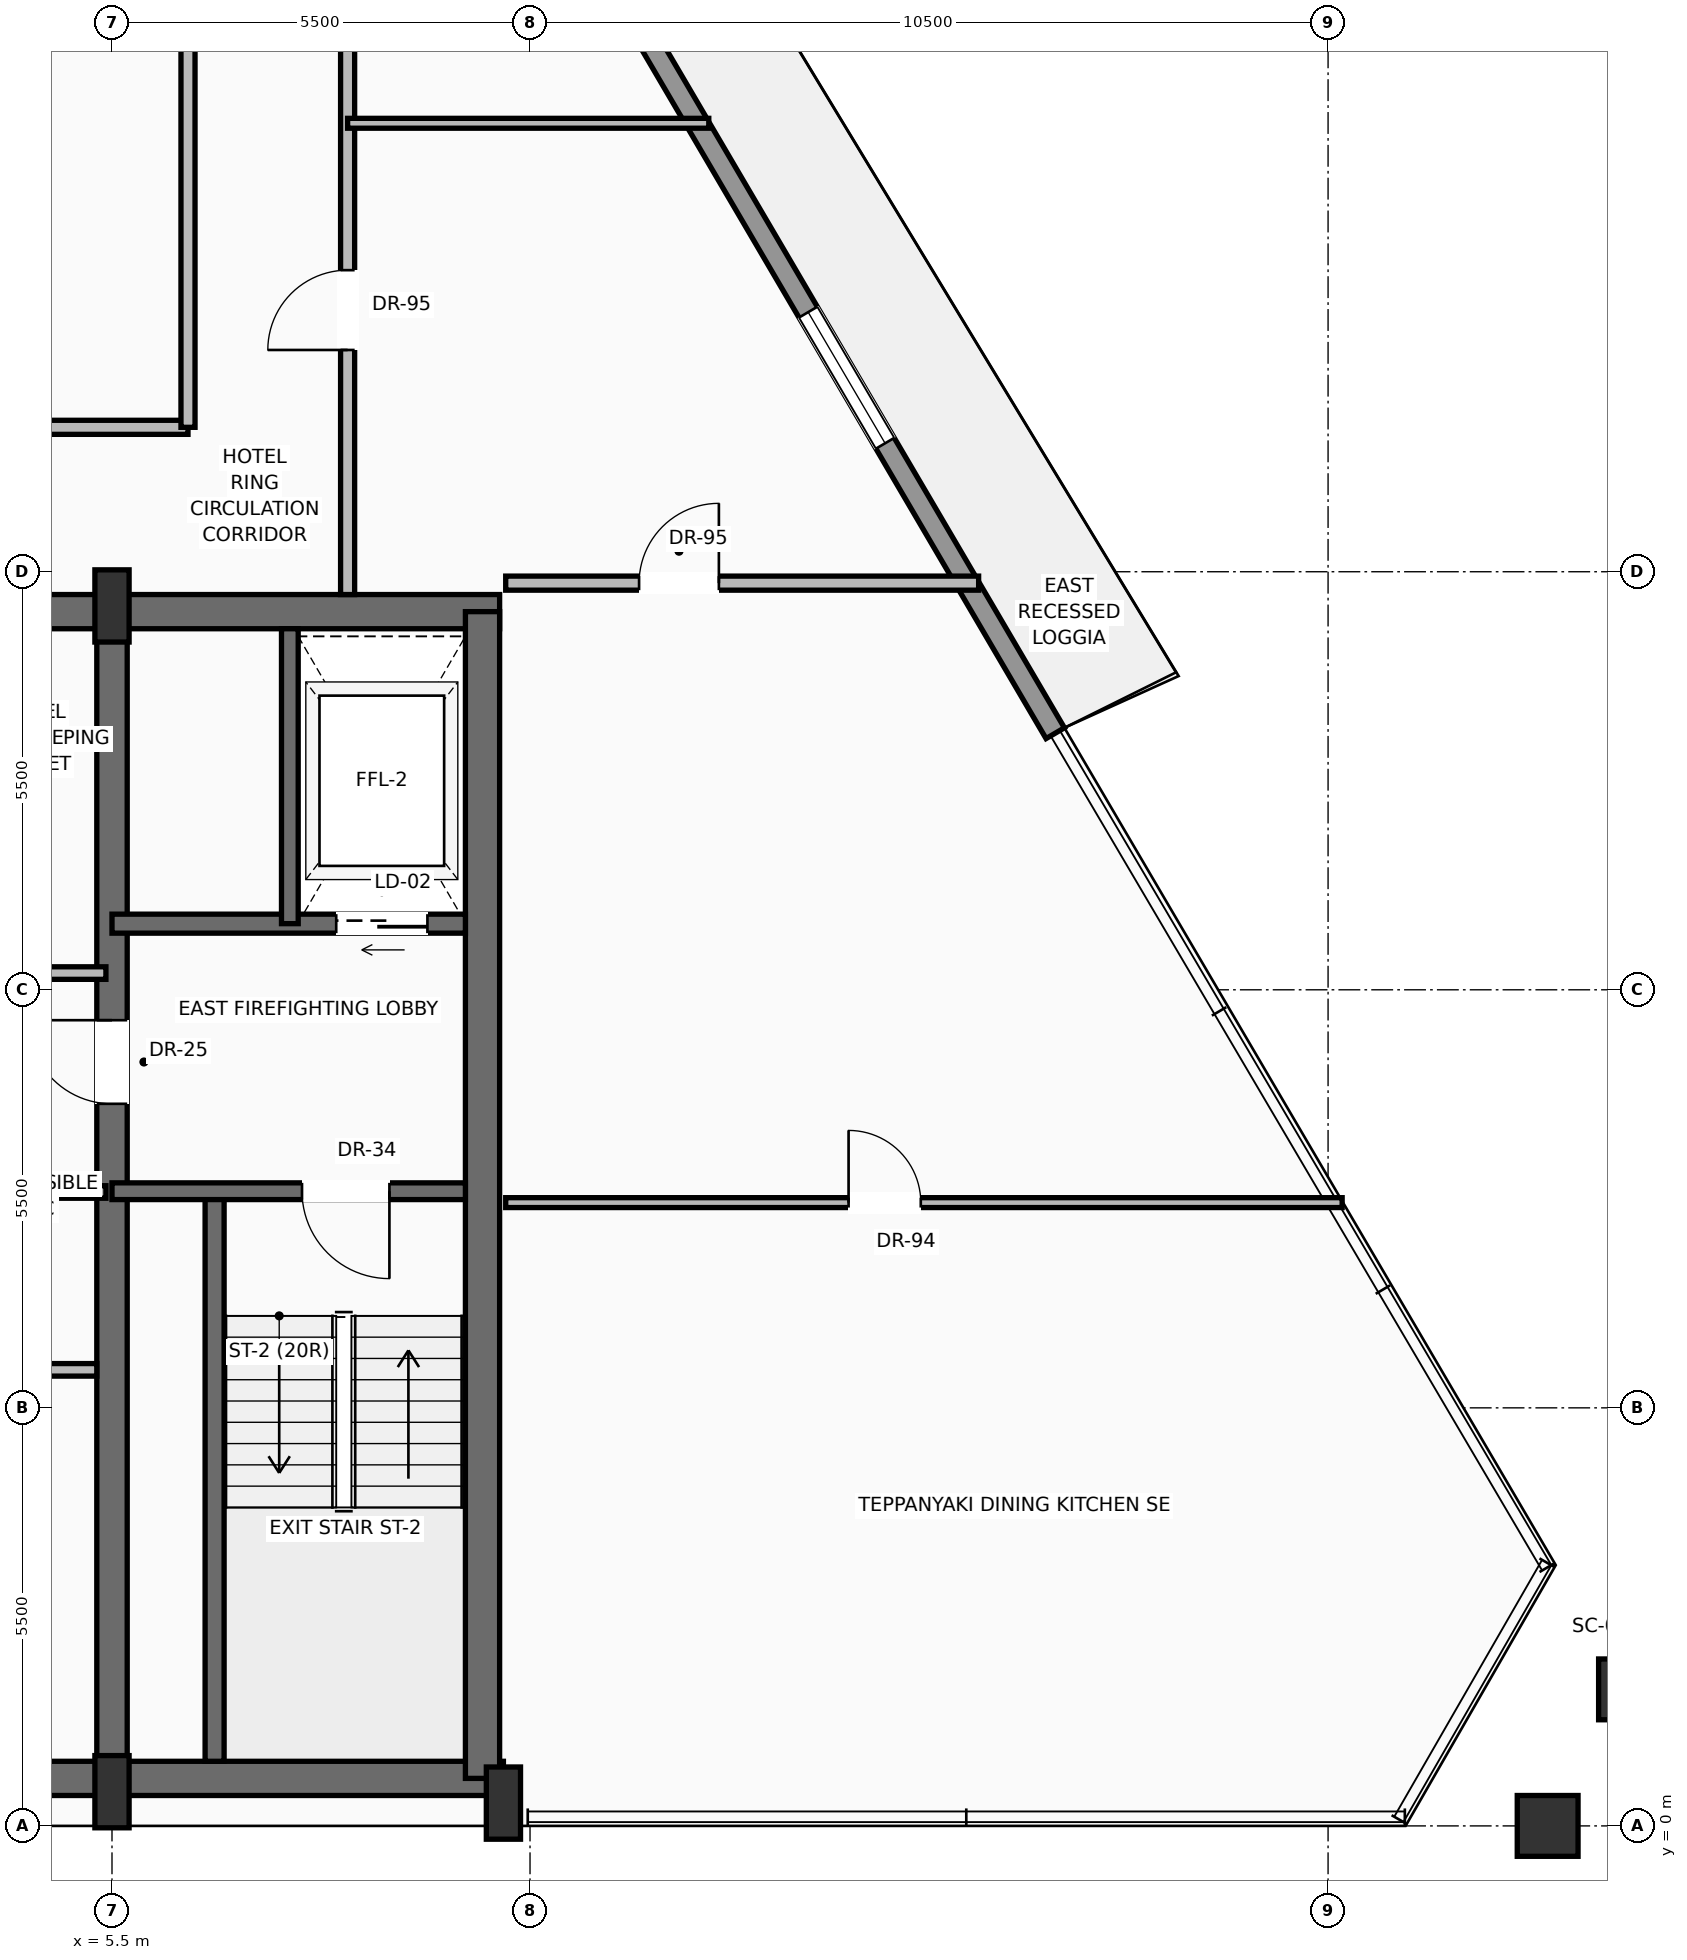
"""IFC4 building model, lengths in metres.
Left out: names, types, materials, properties, quantities, classifications, styles, units other than length and angle.
Written with IfcOpenShell. Run it as: python <this file> out.ifc"""

import sys

from ifc_helpers import new_model, si_unit, direction, frame, frame_2d, origin, origin_2d, place, context, subcontext, project, spatial, rectangle, hollow_rectangle, extrude, source, transform, mapped, element, fill, save


model = new_model("IFC4")
c1 = context("Model", 3, precision=1e-05, world=origin(), true_north=direction((0.0, 1.0)))
c2 = subcontext(c1, "Body", "Model", "MODEL_VIEW")
j1 = project(units=[si_unit("LENGTHUNIT", "METRE"), si_unit("PLANEANGLEUNIT", "RADIAN")], contexts=[c1])
p1 = place(None, origin())
s1 = spatial("IfcSite", under=j1, at=p1, CompositionType="ELEMENT")
p2 = place(p1, origin())
s2 = spatial("IfcBuilding", under=s1, at=p2, CompositionType="ELEMENT")
p3 = place(p2, frame((0.0, 0.0, 283.35)))
s3 = spatial("IfcBuildingStorey", under=s2, at=p3, CompositionType="ELEMENT", Elevation=283.35)
p4 = place(p3, frame((-10.65, 0.625, 0.0), z_axis=(0.0, 0.0, 1.0), x_axis=(1.0, 0.0, 0.0)))
e1 = element("IfcWall", 1, at=p4, inside=s3, PredefinedType="SHEAR", context=c2, shape_type="SweptSolid", body=[
    extrude(rectangle(XDim=21.3, YDim=0.45, at=frame_2d((10.65, 0.0))), origin(), (0.0, 0.0, 1.0), 3.24),
])
p5 = place(p3, frame((-10.6, 15.975, 0.0), z_axis=(0.0, 0.0, 1.0), x_axis=(1.0, 0.0, 0.0)))
e2 = element("IfcWall", 2, at=p5, inside=s3, PredefinedType="SHEAR", context=c2, shape_type="SweptSolid", body=[
    extrude(rectangle(XDim=21.2, YDim=0.45, at=frame_2d((10.6, 0.0))), origin(), (0.0, 0.0, 1.0), 3.24),
])
p6 = place(p5, frame((3.17, 0.0, 0.0)))
e3 = element("IfcOpeningElement", 3, at=p6, cuts=e2, PredefinedType="OPENING", context=c2, shape_type="SweptSolid", body=[
    extrude(rectangle(XDim=1.3, YDim=2.3, at=frame_2d((0.65, 1.15))), frame((0.0, 0.235, 0.0), z_axis=(0.0, -1.0, 0.0), x_axis=(1.0, 0.0, 0.0)), (0.0, 0.0, 1.0), 0.47),
])
p7 = place(p5, frame((9.6, 0.0, 0.0)))
e4 = element("IfcOpeningElement", 4, at=p7, cuts=e2, PredefinedType="OPENING", context=c2, shape_type="SweptSolid", body=[
    extrude(rectangle(XDim=2.0, YDim=2.4, at=frame_2d((1.0, 1.2))), frame((0.0, 0.235, 0.0), z_axis=(0.0, -1.0, 0.0), x_axis=(1.0, 0.0, 0.0)), (0.0, 0.0, 1.0), 0.47),
])
p8 = place(p3, frame((10.375, 0.625, 0.0), z_axis=(0.0, 0.0, 1.0), x_axis=(0.0, 1.0, 0.0)))
e5 = element("IfcWall", 5, at=p8, inside=s3, PredefinedType="SHEAR", context=c2, shape_type="SweptSolid", body=[
    extrude(rectangle(XDim=15.35, YDim=0.45, at=frame_2d((7.675, 0.0))), origin(), (0.0, 0.0, 1.0), 3.24),
])
p9 = place(p3, frame((5.5, 0.625, 0.0), z_axis=(0.0, 0.0, 1.0), x_axis=(0.0, 1.0, 0.0)))
e6 = element("IfcWall", 6, at=p9, inside=s3, PredefinedType="SHEAR", context=c2, shape_type="SweptSolid", body=[
    extrude(rectangle(XDim=15.35, YDim=0.4, at=frame_2d((7.675, 0.0))), origin(), (0.0, 0.0, 1.0), 3.24),
])
p10 = place(p9, frame((8.875, 0.0, 0.0)))
e7 = element("IfcOpeningElement", 7, at=p10, cuts=e6, PredefinedType="OPENING", context=c2, shape_type="SweptSolid", body=[
    extrude(rectangle(XDim=1.1, YDim=2.2, at=frame_2d((0.55, 1.1))), frame((0.0, 0.21, 0.0), z_axis=(0.0, -1.0, 0.0), x_axis=(1.0, 0.0, 0.0)), (0.0, 0.0, 1.0), 0.42),
])
m1 = source(origin(), c2, "Body", "SweptSolid", [
    extrude(rectangle(XDim=0.45, YDim=0.95, at=origin_2d()), origin(), (0.0, 0.0, 1.0), 3.45),
])
for number, where, z_axis, x_axis in (
    (8, (5.5, 0.45, 0.0), (0.0, 0.0, 1.0), (1.0, 0.0, 0.0)),
    (9, (10.65, 0.3, 0.0), (0.0, 0.0, 1.0), (1.0, 0.0, 0.0)),
    (10, (5.5, 16.05, 0.0), (0.0, 0.0, 1.0), (1.0, 0.0, 0.0)),
):
    element("IfcColumn", number, at=place(p3, frame(where, z_axis=z_axis, x_axis=x_axis)), inside=s3, PredefinedType="PILASTER", context=c2, shape_type="MappedRepresentation", body=[
        mapped(m1, transform((0.0, 0.0, 0.0), scale=1.0)),
    ])
m2 = source(origin(), c2, "Body", "SweptSolid", [
    extrude(hollow_rectangle(XDim=0.8, YDim=0.8, WallThickness=0.04, at=origin_2d()), origin(), (0.0, 0.0, 1.0), 3.441),
])
p11 = place(p3, frame((24.389, 0.0, 0.004), z_axis=(-0.003476389068, 0.0, 0.999993957341), x_axis=(0.0, -1.0, 0.0)))
e11 = element("IfcColumn", 11, at=p11, inside=s3, PredefinedType="COLUMN", context=c2, shape_type="MappedRepresentation", body=[
    mapped(m2, transform((0.0, 0.0, 0.0), scale=1.0)),
])
m3 = source(origin(), c2, "Body", "SweptSolid", [
    extrude(hollow_rectangle(XDim=0.8, YDim=0.8, WallThickness=0.04, at=origin_2d()), origin(), (0.0, 0.0, 1.0), 3.442),
])
p12 = place(p3, frame((25.459, 1.796, 0.004), z_axis=(-0.013051601701, -0.015463310711, 0.999795249896), x_axis=(0.764183490387, -0.644998909317, 0.0)))
e12 = element("IfcColumn", 12, at=p12, inside=s3, PredefinedType="COLUMN", context=c2, shape_type="MappedRepresentation", body=[
    mapped(m3, transform((0.0, 0.0, 0.0), scale=1.0)),
])
p13 = place(p3, frame((7.752, 31.686, 0.0), z_axis=(0.0, 0.0, 1.0), x_axis=(0.506132125438, -0.862455953426, 0.0)))
e13 = element("IfcWall", 13, at=p13, inside=s3, PredefinedType="SOLIDWALL", context=c2, shape_type="SweptSolid", body=[
    extrude(rectangle(XDim=20.071, YDim=0.28, at=frame_2d((10.036, 0.0))), origin(), (0.0, 0.0, 1.0), 2.82),
])
p14 = place(p13, frame((4.817, 0.0, 0.0)))
e14 = element("IfcOpeningElement", 14, at=p14, cuts=e13, PredefinedType="OPENING", context=c2, shape_type="SweptSolid", body=[
    extrude(rectangle(XDim=1.6, YDim=2.35, at=frame_2d((0.8, 1.175))), frame((0.0, 0.15, 0.0), z_axis=(0.0, -1.0, 0.0), x_axis=(1.0, 0.0, 0.0)), (0.0, 0.0, 1.0), 0.3),
])
p15 = place(p13, frame((13.648, 0.0, 0.9)))
e15 = element("IfcOpeningElement", 15, at=p15, cuts=e13, PredefinedType="OPENING", context=c2, shape_type="SweptSolid", body=[
    extrude(rectangle(XDim=2.0, YDim=1.75, at=frame_2d((1.0, 0.875))), frame((0.0, 0.15, 0.0), z_axis=(0.0, -1.0, 0.0), x_axis=(1.0, 0.0, 0.0)), (0.0, 0.0, 1.0), 0.3),
])
p16 = place(p3, frame((6.85, 0.85, 0.0), z_axis=(0.0, 0.0, 1.0), x_axis=(0.0, 1.0, 0.0)))
e16 = element("IfcWall", 16, at=p16, inside=s3, PredefinedType="SOLIDWALL", context=c2, shape_type="SweptSolid", body=[
    extrude(rectangle(XDim=7.5, YDim=0.25, at=frame_2d((3.75, 0.0))), origin(), (0.0, 0.0, 1.0), 3.24),
])
p17 = place(p3, frame((10.15, 8.35, 0.0), z_axis=(0.0, 0.0, 1.0), x_axis=(-1.0, 0.0, 0.0)))
e17 = element("IfcWall", 17, at=p17, inside=s3, PredefinedType="SOLIDWALL", context=c2, shape_type="SweptSolid", body=[
    extrude(rectangle(XDim=4.65, YDim=0.22, at=frame_2d((2.325, 0.0))), origin(), (0.0, 0.0, 1.0), 3.24),
])
p18 = place(p17, frame((1.0, 0.0, 0.0)))
e18 = element("IfcOpeningElement", 18, at=p18, cuts=e17, PredefinedType="OPENING", context=c2, shape_type="SweptSolid", body=[
    extrude(rectangle(XDim=1.15, YDim=2.2, at=frame_2d((0.575, 1.1))), frame((0.0, 0.12, 0.0), z_axis=(0.0, -1.0, 0.0), x_axis=(1.0, 0.0, 0.0)), (0.0, 0.0, 1.0), 0.24),
])
p19 = place(p3, frame((10.15, 11.87, 0.0), z_axis=(0.0, 0.0, 1.0), x_axis=(-1.0, 0.0, 0.0)))
e19 = element("IfcWall", 19, at=p19, inside=s3, PredefinedType="SOLIDWALL", context=c2, shape_type="SweptSolid", body=[
    extrude(rectangle(XDim=4.65, YDim=0.25, at=frame_2d((2.325, 0.0))), origin(), (0.0, 0.0, 1.0), 3.24),
])
p20 = place(p19, frame((0.5, 0.0, 0.0)))
e20 = element("IfcOpeningElement", 20, at=p20, cuts=e19, PredefinedType="OPENING", context=c2, shape_type="SweptSolid", body=[
    extrude(rectangle(XDim=1.2, YDim=2.25, at=frame_2d((0.6, 1.125))), frame((0.0, 0.135, 0.0), z_axis=(0.0, -1.0, 0.0), x_axis=(1.0, 0.0, 0.0)), (0.0, 0.0, 1.0), 0.27),
])
p21 = place(p3, frame((7.84, 11.87, 0.0), z_axis=(0.0, 0.0, 1.0), x_axis=(0.0, 1.0, 0.0)))
e21 = element("IfcWall", 21, at=p21, inside=s3, PredefinedType="SOLIDWALL", context=c2, shape_type="SweptSolid", body=[
    extrude(rectangle(XDim=3.88, YDim=0.22, at=frame_2d((1.94, 0.0))), origin(), (0.0, 0.0, 1.0), 3.24),
])
p22 = place(p3, frame((-5.5, 6.0, 0.0), z_axis=(0.0, 0.0, 1.0), x_axis=(1.0, 0.0, 0.0)))
e22 = element("IfcWall", 22, at=p22, inside=s3, PredefinedType="PARTITIONING", context=c2, shape_type="SweptSolid", body=[
    extrude(rectangle(XDim=10.8, YDim=0.165, at=frame_2d((5.4, 0.0))), origin(), (0.0, 0.0, 1.0), 3.232),
])
p23 = place(p22, frame((7.7, 0.0, 0.0)))
e23 = element("IfcOpeningElement", 23, at=p23, cuts=e22, PredefinedType="OPENING", context=c2, shape_type="SweptSolid", body=[
    extrude(rectangle(XDim=0.9, YDim=2.1, at=frame_2d((0.45, 1.05))), frame((0.0, 0.093, 0.0), z_axis=(0.0, -1.0, 0.0), x_axis=(1.0, 0.0, 0.0)), (0.0, 0.0, 1.0), 0.185),
])
for number, where, z_axis, x_axis in (
    (24, (3.54, 8.34, 0.0), (0.0, 0.0, 1.0), (1.0, 0.0, 0.0)),
    (25, (3.54, 11.22, 0.0), (0.0, 0.0, 1.0), (1.0, 0.0, 0.0)),
):
    element("IfcWall", number, at=place(p3, frame(where, z_axis=z_axis, x_axis=x_axis)), inside=s3, PredefinedType="PARTITIONING", context=c2, shape_type="SweptSolid", body=[
        extrude(rectangle(XDim=1.88, YDim=0.165, at=frame_2d((0.94, 0.0))), origin(), (0.0, 0.0, 1.0), 3.232),
    ])
p24 = place(p3, frame((-5.95, 18.4, 0.0), z_axis=(0.0, 0.0, 1.0), x_axis=(1.0, 0.0, 0.0)))
e26 = element("IfcWall", 26, at=p24, inside=s3, PredefinedType="PARTITIONING", context=c2, shape_type="SweptSolid", body=[
    extrude(rectangle(XDim=12.45, YDim=0.185, at=frame_2d((6.225, 0.0))), origin(), (0.0, 0.0, 1.0), 3.232),
])
p25 = place(p24, frame((5.75, 0.0, 0.0)))
e27 = element("IfcOpeningElement", 27, at=p25, cuts=e26, PredefinedType="OPENING", context=c2, shape_type="SweptSolid", body=[
    extrude(rectangle(XDim=0.95, YDim=2.2, at=frame_2d((0.475, 1.1))), frame((0.0, 0.103, 0.0), z_axis=(0.0, -1.0, 0.0), x_axis=(1.0, 0.0, 0.0)), (0.0, 0.0, 1.0), 0.205),
])
p26 = place(p3, frame((6.5, 18.4, 0.0), z_axis=(0.0, 0.0, 1.0), x_axis=(0.0, 1.0, 0.0)))
e28 = element("IfcWall", 28, at=p26, inside=s3, PredefinedType="PARTITIONING", context=c2, shape_type="SweptSolid", body=[
    extrude(rectangle(XDim=8.1, YDim=0.185, at=frame_2d((4.05, 0.0))), origin(), (0.0, 0.0, 1.0), 3.232),
])
p27 = place(p3, frame((8.6, 16.2, 0.0), z_axis=(0.0, 0.0, 1.0), x_axis=(0.0, 1.0, 0.0)))
e29 = element("IfcWall", 29, at=p27, inside=s3, PredefinedType="PARTITIONING", context=c2, shape_type="SweptSolid", body=[
    extrude(rectangle(XDim=12.4, YDim=0.185, at=frame_2d((6.2, 0.0))), origin(), (0.0, 0.0, 1.0), 3.232),
])
p28 = place(p27, frame((3.218, 0.0, 0.0)))
e30 = element("IfcOpeningElement", 30, at=p28, cuts=e29, PredefinedType="OPENING", context=c2, shape_type="SweptSolid", body=[
    extrude(rectangle(XDim=1.05, YDim=2.25, at=frame_2d((0.525, 1.125))), frame((0.0, 0.103, 0.0), z_axis=(0.0, -1.0, 0.0), x_axis=(1.0, 0.0, 0.0)), (0.0, 0.0, 1.0), 0.205),
])
p29 = place(p27, frame((8.936, 0.0, 0.0)))
e31 = element("IfcOpeningElement", 31, at=p29, cuts=e29, PredefinedType="OPENING", context=c2, shape_type="SweptSolid", body=[
    extrude(rectangle(XDim=1.05, YDim=2.25, at=frame_2d((0.525, 1.125))), frame((0.0, 0.103, 0.0), z_axis=(0.0, -1.0, 0.0), x_axis=(1.0, 0.0, 0.0)), (0.0, 0.0, 1.0), 0.205),
])
p30 = place(p3, frame((10.68, 16.35, 0.0), z_axis=(0.0, 0.0, 1.0), x_axis=(1.0, 0.0, 0.0)))
e32 = element("IfcWall", 32, at=p30, inside=s3, PredefinedType="PARTITIONING", context=c2, shape_type="SweptSolid", body=[
    extrude(rectangle(XDim=6.222, YDim=0.185, at=frame_2d((3.111, 0.0))), origin(), (0.0, 0.0, 1.0), 3.232),
])
p31 = place(p30, frame((1.755, 0.0, 0.0)))
e33 = element("IfcOpeningElement", 33, at=p31, cuts=e32, PredefinedType="OPENING", context=c2, shape_type="SweptSolid", body=[
    extrude(rectangle(XDim=1.05, YDim=2.25, at=frame_2d((0.525, 1.125))), frame((0.0, 0.103, 0.0), z_axis=(0.0, -1.0, 0.0), x_axis=(1.0, 0.0, 0.0)), (0.0, 0.0, 1.0), 0.205),
])
p32 = place(p3, frame((10.68, 8.2, 0.0), z_axis=(0.0, 0.0, 1.0), x_axis=(1.0, 0.0, 0.0)))
e34 = element("IfcWall", 34, at=p32, inside=s3, PredefinedType="PARTITIONING", context=c2, shape_type="SweptSolid", body=[
    extrude(rectangle(XDim=11.005, YDim=0.13, at=frame_2d((5.503, 0.0))), origin(), (0.0, 0.0, 1.0), 3.232),
])
p33 = place(p32, frame((4.511, 0.0, 0.0)))
e35 = element("IfcOpeningElement", 35, at=p33, cuts=e34, PredefinedType="OPENING", context=c2, shape_type="SweptSolid", body=[
    extrude(rectangle(XDim=0.95, YDim=2.2, at=frame_2d((0.475, 1.1))), frame((0.0, 0.075, 0.0), z_axis=(0.0, -1.0, 0.0), x_axis=(1.0, 0.0, 0.0)), (0.0, 0.0, 1.0), 0.15),
])
p34 = place(p3, frame((8.6, 22.4, 0.0), z_axis=(0.0, 0.0, 1.0), x_axis=(1.0, 0.0, 0.0)))
e36 = element("IfcWall", 36, at=p34, inside=s3, PredefinedType="PARTITIONING", context=c2, shape_type="SweptSolid", body=[
    extrude(rectangle(XDim=4.752, YDim=0.13, at=frame_2d((2.376, 0.0))), origin(), (0.0, 0.0, 1.0), 3.232),
])
m4 = source(origin(), c2, "Body", "SweptSolid", [
    extrude(rectangle(XDim=2.0, YDim=1.75, at=frame_2d((1.0, 0.875))), frame((0.0, 0.03, 0.0), z_axis=(0.0, -1.0, 0.0), x_axis=(1.0, 0.0, 0.0)), (0.0, 0.0, 1.0), 0.06),
])
p35 = place(p15, origin())
e37 = element("IfcWindow", 37, at=p35, inside=s3, PartitioningType="SINGLE_PANEL", PredefinedType="WINDOW", context=c2, shape_type="MappedRepresentation", body=[
    mapped(m4, transform((0.0, 0.0, 0.0), scale=1.0)),
])
fill(e15, e37)
m5 = source(origin(), c2, "Body", "SweptSolid", [
    extrude(rectangle(XDim=1.15, YDim=2.2, at=frame_2d((0.575, 1.1))), frame((0.0, 0.025, 0.0), z_axis=(0.0, -1.0, 0.0), x_axis=(1.0, 0.0, 0.0)), (0.0, 0.0, 1.0), 0.05),
])
p36 = place(p18, origin())
e38 = element("IfcDoor", 38, at=p36, inside=s3, OperationType="SINGLE_SWING_LEFT", PredefinedType="DOOR", context=c2, shape_type="MappedRepresentation", body=[
    mapped(m5, transform((0.0, 0.0, 0.0), scale=1.0)),
])
fill(e18, e38)
m6 = source(origin(), c2, "Body", "SweptSolid", [
    extrude(rectangle(XDim=1.1, YDim=2.2, at=frame_2d((0.55, 1.1))), frame((0.0, 0.025, 0.0), z_axis=(0.0, -1.0, 0.0), x_axis=(1.0, 0.0, 0.0)), (0.0, 0.0, 1.0), 0.05),
])
p37 = place(p10, origin())
e39 = element("IfcDoor", 39, at=p37, inside=s3, OperationType="SINGLE_SWING_RIGHT", PredefinedType="DOOR", context=c2, shape_type="MappedRepresentation", body=[
    mapped(m6, transform((0.0, 0.0, 0.0), scale=1.0)),
])
fill(e7, e39)
m7 = source(origin(), c2, "Body", "SweptSolid", [
    extrude(rectangle(XDim=1.2, YDim=2.25, at=frame_2d((0.6, 1.125))), frame((0.0, 0.025, 0.0), z_axis=(0.0, -1.0, 0.0), x_axis=(1.0, 0.0, 0.0)), (0.0, 0.0, 1.0), 0.05),
])
p38 = place(p20, origin())
e40 = element("IfcDoor", 40, at=p38, inside=s3, OperationType="SLIDING_TO_RIGHT", PredefinedType="DOOR", context=c2, shape_type="MappedRepresentation", body=[
    mapped(m7, transform((0.0, 0.0, 0.0), scale=1.0)),
])
fill(e20, e40)
m8 = source(origin(), c2, "Body", "SweptSolid", [
    extrude(rectangle(XDim=1.05, YDim=2.25, at=frame_2d((0.525, 1.125))), frame((0.0, 0.025, 0.0), z_axis=(0.0, -1.0, 0.0), x_axis=(1.0, 0.0, 0.0)), (0.0, 0.0, 1.0), 0.05),
])
p39 = place(p31, origin())
e41 = element("IfcDoor", 41, at=p39, inside=s3, OperationType="SINGLE_SWING_RIGHT", PredefinedType="DOOR", context=c2, shape_type="MappedRepresentation", body=[
    mapped(m8, transform((0.0, 0.0, 0.0), scale=1.0)),
])
fill(e33, e41)
m9 = source(origin(), c2, "Body", "SweptSolid", [
    extrude(rectangle(XDim=0.95, YDim=2.2, at=frame_2d((0.475, 1.1))), frame((0.0, 0.025, 0.0), z_axis=(0.0, -1.0, 0.0), x_axis=(1.0, 0.0, 0.0)), (0.0, 0.0, 1.0), 0.05),
])
p40 = place(p33, origin())
e42 = element("IfcDoor", 42, at=p40, inside=s3, OperationType="SINGLE_SWING_LEFT", PredefinedType="DOOR", context=c2, shape_type="MappedRepresentation", body=[
    mapped(m9, transform((0.0, 0.0, 0.0), scale=1.0)),
])
fill(e35, e42)
p41 = place(p28, origin())
e43 = element("IfcDoor", 43, at=p41, inside=s3, OperationType="SINGLE_SWING_LEFT", PredefinedType="DOOR", context=c2, shape_type="MappedRepresentation", body=[
    mapped(m8, transform((0.0, 0.0, 0.0), scale=1.0)),
])
fill(e30, e43)
save(model, sys.argv[1])
